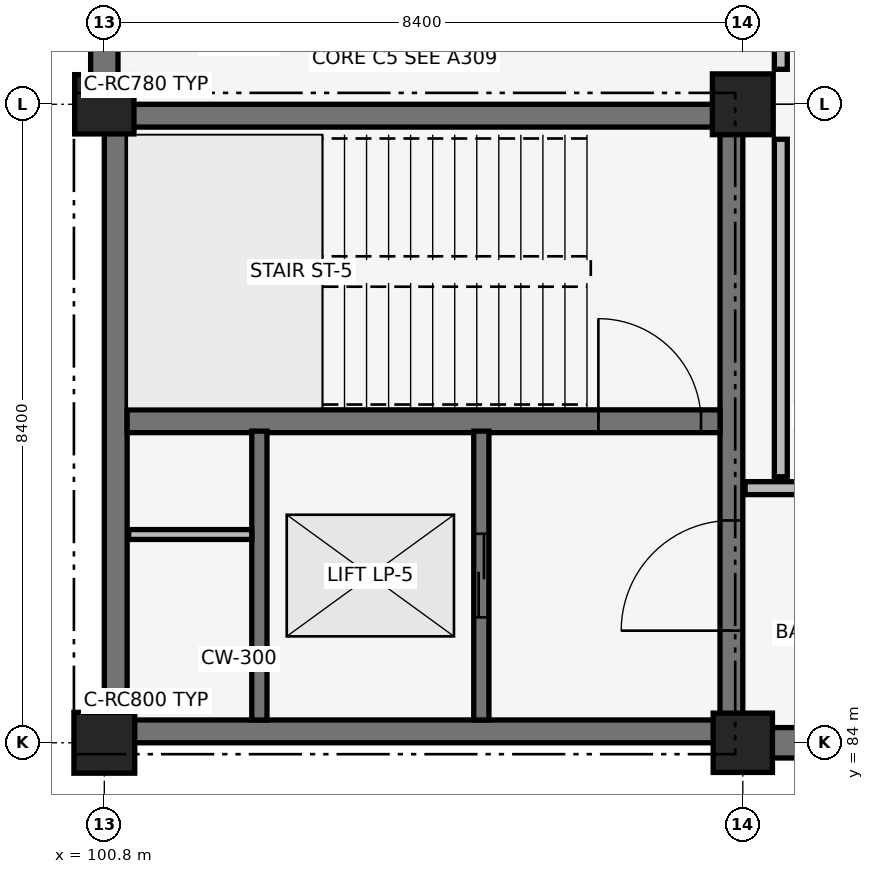
"""IFC4 building model, lengths in metres.
Left out: names, types, materials, properties, quantities, classifications, styles, units other than length and angle.
Written with IfcOpenShell. Run it as: python <this file> out.ifc"""

import sys

from ifc_helpers import new_model, si_unit, direction, frame, frame_2d, origin, origin_2d, place, context, subcontext, project, spatial, rectangle, extrude, element, fill, save


model = new_model("IFC4")
c1 = context("Model", 3, precision=1e-05, world=origin(), true_north=direction((0.0, 1.0)))
c2 = subcontext(c1, "Body", "Model", "MODEL_VIEW")
j1 = project(units=[si_unit("LENGTHUNIT", "METRE"), si_unit("PLANEANGLEUNIT", "RADIAN")], contexts=[c1])
p1 = place(None, origin())
s1 = spatial("IfcSite", under=j1, at=p1, CompositionType="ELEMENT")
p2 = place(p1, origin())
s2 = spatial("IfcBuilding", under=s1, at=p2, CompositionType="ELEMENT")
p3 = place(p2, frame((0.0, 0.0, -4.42)))
s3 = spatial("IfcBuildingStorey", under=s2, at=p3, CompositionType="ELEMENT", Elevation=-4.42)
p4 = place(p3, frame((100.8, 92.75, 0.0), z_axis=(0.0, 0.0, 1.0), x_axis=(0.0, 1.0, 0.0)))
e1 = element("IfcWall", 1, at=p4, inside=s3, PredefinedType="USERDEFINED", context=c2, shape_type="SweptSolid", body=[
    extrude(rectangle(XDim=7.7, YDim=0.36, at=frame_2d((3.85, 0.0))), origin(), (0.0, 0.0, 1.0), 4.12),
])
p5 = place(p3, frame((109.55, 84.0, 0.0), z_axis=(0.0, 0.0, 1.0), x_axis=(1.0, 0.0, 0.0)))
e2 = element("IfcWall", 2, at=p5, inside=s3, PredefinedType="USERDEFINED", context=c2, shape_type="SweptSolid", body=[
    extrude(rectangle(XDim=7.7, YDim=0.4, at=frame_2d((3.85, 0.0))), origin(), (0.0, 0.0, 1.0), 4.12),
])
for number, where, z_axis, x_axis in (
    (3, (100.95, 84.15, 0.0), (0.0, 0.0, 1.0), (1.0, 0.0, 0.0)),
    (4, (100.95, 92.25, 0.0), (0.0, 0.0, 1.0), (1.0, 0.0, 0.0)),
    (5, (100.95, 84.15, 0.0), (0.0, 0.0, 1.0), (0.0, 1.0, 0.0)),
):
    element("IfcWall", number, at=place(p3, frame(where, z_axis=z_axis, x_axis=x_axis)), inside=s3, PredefinedType="SHEAR", context=c2, shape_type="SweptSolid", body=[
        extrude(rectangle(XDim=8.1, YDim=0.3, at=frame_2d((4.05, 0.0))), origin(), (0.0, 0.0, 1.0), 4.12),
    ])
p6 = place(p3, frame((109.05, 84.15, 0.0), z_axis=(0.0, 0.0, 1.0), x_axis=(0.0, 1.0, 0.0)))
e6 = element("IfcWall", 6, at=p6, inside=s3, PredefinedType="SHEAR", context=c2, shape_type="SweptSolid", body=[
    extrude(rectangle(XDim=8.1, YDim=0.3, at=frame_2d((4.05, 0.0))), origin(), (0.0, 0.0, 1.0), 4.12),
])
p7 = place(p6, frame((1.325, 0.0, 0.0)))
e7 = element("IfcOpeningElement", 7, at=p7, cuts=e6, PredefinedType="OPENING", context=c2, shape_type="SweptSolid", body=[
    extrude(rectangle(XDim=1.45, YDim=2.15, at=frame_2d((0.725, 1.075))), frame((0.0, 0.16, 0.0), z_axis=(0.0, -1.0, 0.0), x_axis=(1.0, 0.0, 0.0)), (0.0, 0.0, 1.0), 0.32),
])
p8 = place(p3, frame((101.1, 88.23, 0.0), z_axis=(0.0, 0.0, 1.0), x_axis=(1.0, 0.0, 0.0)))
e8 = element("IfcWall", 8, at=p8, inside=s3, PredefinedType="SHEAR", context=c2, shape_type="SweptSolid", body=[
    extrude(rectangle(XDim=7.8, YDim=0.3, at=frame_2d((3.9, 0.0))), origin(), (0.0, 0.0, 1.0), 4.12),
])
p9 = place(p8, frame((6.2, 0.0, 0.0)))
e9 = element("IfcOpeningElement", 9, at=p9, cuts=e8, PredefinedType="OPENING", context=c2, shape_type="SweptSolid", body=[
    extrude(rectangle(XDim=1.35, YDim=2.15, at=frame_2d((0.675, 1.075))), frame((0.0, 0.16, 0.0), z_axis=(0.0, -1.0, 0.0), x_axis=(1.0, 0.0, 0.0)), (0.0, 0.0, 1.0), 0.32),
])
p10 = place(p3, frame((100.8, 84.0, -0.4), z_axis=(0.0, 0.0, 1.0), x_axis=(1.0, 0.0, 0.0)))
e10 = element("IfcColumn", 10, at=p10, inside=s3, PredefinedType="COLUMN", context=c2, shape_type="SweptSolid", body=[
    extrude(rectangle(XDim=0.8, YDim=0.8, at=origin_2d()), origin(), (0.0, 0.0, 1.0), 4.52),
])
for number, where, z_axis, x_axis in (
    (11, (100.8, 92.4, -0.4), (0.0, 0.0, 1.0), (1.0, 0.0, 0.0)),
    (12, (109.2, 84.0, -0.4), (0.0, 0.0, 1.0), (1.0, 0.0, 0.0)),
):
    element("IfcColumn", number, at=place(p3, frame(where, z_axis=z_axis, x_axis=x_axis)), inside=s3, PredefinedType="COLUMN", context=c2, shape_type="SweptSolid", body=[
        extrude(rectangle(XDim=0.78, YDim=0.78, at=origin_2d()), origin(), (0.0, 0.0, 1.0), 4.52),
    ])
p11 = place(p3, frame((109.2, 92.4, -0.4), z_axis=(0.0, 0.0, 1.0), x_axis=(1.0, 0.0, 0.0)))
e13 = element("IfcColumn", 13, at=p11, inside=s3, PredefinedType="COLUMN", context=c2, shape_type="SweptSolid", body=[
    extrude(rectangle(XDim=0.8, YDim=0.8, at=origin_2d()), origin(), (0.0, 0.0, 1.0), 4.52),
])
p12 = place(p3, frame((105.76, 84.3, 0.0), z_axis=(0.0, 0.0, 1.0), x_axis=(0.0, 1.0, 0.0)))
e14 = element("IfcWall", 14, at=p12, inside=s3, PredefinedType="SHEAR", context=c2, shape_type="SweptSolid", body=[
    extrude(rectangle(XDim=3.8, YDim=0.2, at=frame_2d((1.9, 0.0))), origin(), (0.0, 0.0, 1.0), 3.36),
])
p13 = place(p12, frame((1.35, 0.0, 0.0)))
e15 = element("IfcOpeningElement", 15, at=p13, cuts=e14, PredefinedType="OPENING", context=c2, shape_type="SweptSolid", body=[
    extrude(rectangle(XDim=1.1, YDim=2.15, at=frame_2d((0.55, 1.075))), frame((0.0, 0.11, 0.0), z_axis=(0.0, -1.0, 0.0), x_axis=(1.0, 0.0, 0.0)), (0.0, 0.0, 1.0), 0.22),
])
p14 = place(p3, frame((102.84, 84.3, 0.0), z_axis=(0.0, 0.0, 1.0), x_axis=(0.0, 1.0, 0.0)))
e16 = element("IfcWall", 16, at=p14, inside=s3, PredefinedType="SHEAR", context=c2, shape_type="SweptSolid", body=[
    extrude(rectangle(XDim=3.8, YDim=0.2, at=frame_2d((1.9, 0.0))), origin(), (0.0, 0.0, 1.0), 3.36),
])
p15 = place(p3, frame((101.12, 86.74, 0.0), z_axis=(0.0, 0.0, 1.0), x_axis=(1.0, 0.0, 0.0)))
e17 = element("IfcWall", 17, at=p15, inside=s3, PredefinedType="PARTITIONING", context=c2, shape_type="SweptSolid", body=[
    extrude(rectangle(XDim=1.62, YDim=0.13, at=frame_2d((0.81, 0.0))), origin(), (0.0, 0.0, 1.0), 3.35),
])
p16 = place(p3, frame((109.23, 87.35, 0.0), z_axis=(0.0, 0.0, 1.0), x_axis=(1.0, 0.0, 0.0)))
e18 = element("IfcWall", 18, at=p16, inside=s3, PredefinedType="PARTITIONING", context=c2, shape_type="SweptSolid", body=[
    extrude(rectangle(XDim=16.74, YDim=0.17, at=frame_2d((8.37, 0.0))), origin(), (0.0, 0.0, 1.0), 3.32),
])
p17 = place(p16, frame((7.82, 0.0, 0.0)))
e19 = element("IfcOpeningElement", 19, at=p17, cuts=e18, PredefinedType="OPENING", context=c2, shape_type="SweptSolid", body=[
    extrude(rectangle(XDim=1.1, YDim=2.15, at=frame_2d((0.55, 1.075))), frame((0.0, 0.095, 0.0), z_axis=(0.0, -1.0, 0.0), x_axis=(1.0, 0.0, 0.0)), (0.0, 0.0, 1.0), 0.19),
])
p18 = place(p3, frame((109.7, 87.5, 0.0), z_axis=(0.0, 0.0, 1.0), x_axis=(0.0, 1.0, 0.0)))
e20 = element("IfcWall", 20, at=p18, inside=s3, PredefinedType="PARTITIONING", context=c2, shape_type="SweptSolid", body=[
    extrude(rectangle(XDim=4.44, YDim=0.17, at=frame_2d((2.22, 0.0))), origin(), (0.0, 0.0, 1.0), 3.56),
])
p19 = place(p3, frame((109.7, 92.86, 0.0), z_axis=(0.0, 0.0, 1.0), x_axis=(0.0, 1.0, 0.0)))
e21 = element("IfcWall", 21, at=p19, inside=s3, PredefinedType="PARTITIONING", context=c2, shape_type="SweptSolid", body=[
    extrude(rectangle(XDim=7.49, YDim=0.17, at=frame_2d((3.745, 0.0))), origin(), (0.0, 0.0, 1.0), 3.57),
])
p20 = place(p9, origin())
e22 = element("IfcDoor", 22, at=p20, inside=s3, OperationType="SINGLE_SWING_LEFT", PredefinedType="DOOR", context=c2, shape_type="SweptSolid", body=[
    extrude(rectangle(XDim=1.35, YDim=2.15, at=frame_2d((0.675, 1.075))), frame((0.0, 0.025, 0.0), z_axis=(0.0, -1.0, 0.0), x_axis=(1.0, 0.0, 0.0)), (0.0, 0.0, 1.0), 0.05),
])
fill(e9, e22)
p21 = place(p13, origin())
e23 = element("IfcDoor", 23, at=p21, inside=s3, OperationType="SLIDING_TO_LEFT", PredefinedType="DOOR", context=c2, shape_type="SweptSolid", body=[
    extrude(rectangle(XDim=1.1, YDim=2.15, at=frame_2d((0.55, 1.075))), frame((0.0, 0.025, 0.0), z_axis=(0.0, -1.0, 0.0), x_axis=(1.0, 0.0, 0.0)), (0.0, 0.0, 1.0), 0.05),
])
fill(e15, e23)
p22 = place(p7, origin())
e24 = element("IfcDoor", 24, at=p22, inside=s3, OperationType="DOUBLE_DOOR_SINGLE_SWING", PredefinedType="DOOR", context=c2, shape_type="SweptSolid", body=[
    extrude(rectangle(XDim=1.45, YDim=2.15, at=frame_2d((0.725, 1.075))), frame((0.0, 0.025, 0.0), z_axis=(0.0, -1.0, 0.0), x_axis=(1.0, 0.0, 0.0)), (0.0, 0.0, 1.0), 0.05),
])
fill(e7, e24)
save(model, sys.argv[1])
